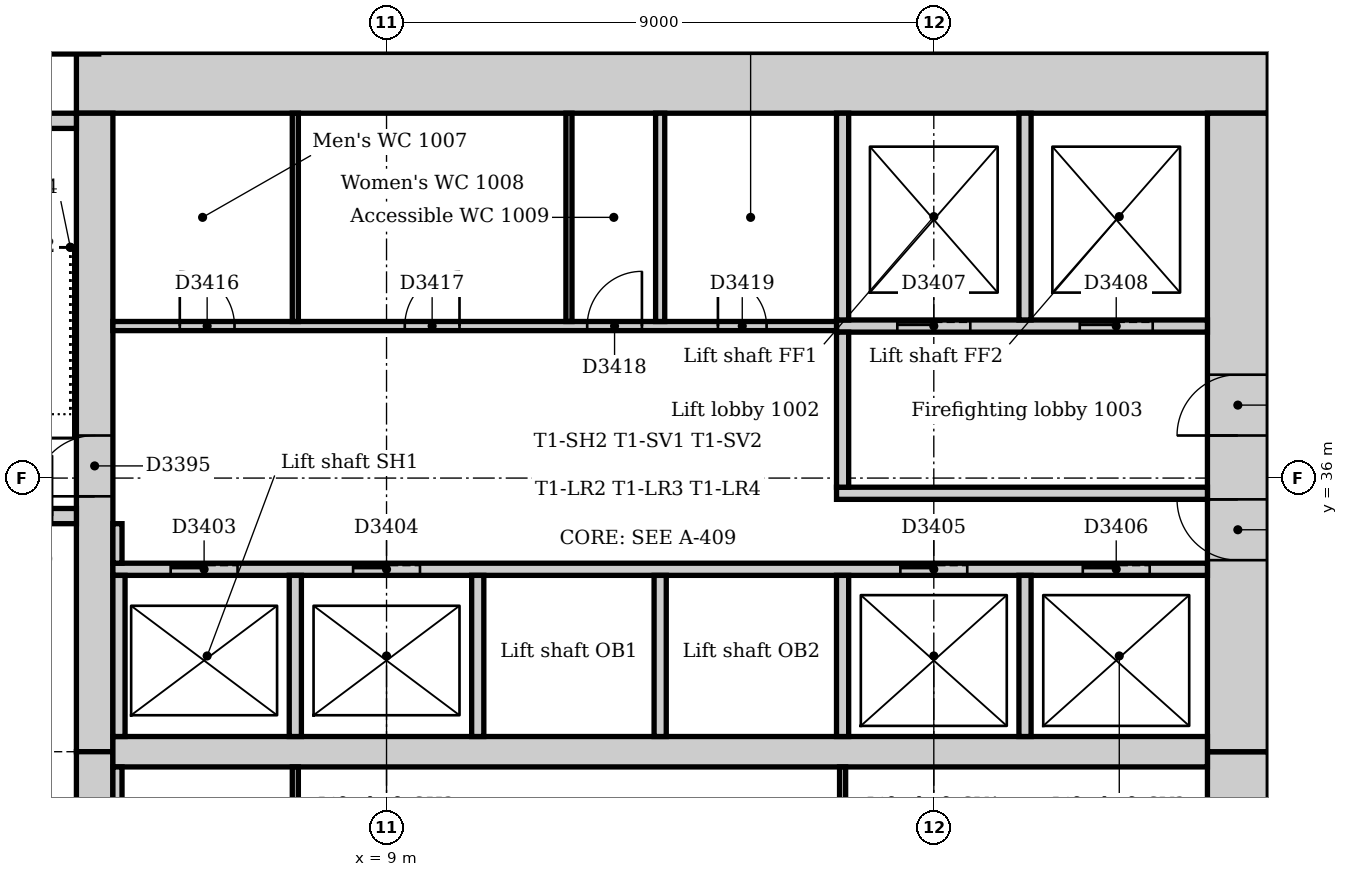
"""IFC4 building model, lengths in metres.
Left out: names, types, materials, properties, quantities, classifications, styles, units other than length and angle.
Written with IfcOpenShell. Run it as: python <this file> out.ifc"""

import sys

from ifc_helpers import new_model, si_unit, direction, frame, frame_2d, origin, origin_2d, place, context, subcontext, project, spatial, rectangle, extrude, element, fill, save


model = new_model("IFC4")
c1 = context("Model", 3, precision=1e-05, world=origin(), true_north=direction((0.0, 1.0)))
c2 = subcontext(c1, "Body", "Model", "MODEL_VIEW")
j1 = project(units=[si_unit("LENGTHUNIT", "METRE"), si_unit("PLANEANGLEUNIT", "RADIAN")], contexts=[c1])
p1 = place(None, origin())
s1 = spatial("IfcSite", under=j1, at=p1, CompositionType="ELEMENT")
p2 = place(p1, origin())
s2 = spatial("IfcBuilding", under=s1, at=p2, CompositionType="ELEMENT")
p3 = place(p2, frame((0.0, 0.0, 46.0)))
s3 = spatial("IfcBuildingStorey", under=s2, at=p3, CompositionType="ELEMENT", Elevation=46.0)
p4 = place(p3, frame((23.5, 42.5, 0.0), z_axis=(0.0, 0.0, 1.0), x_axis=(-1.0, 0.0, 0.0)))
e1 = element("IfcWall", 1, at=p4, inside=s3, PredefinedType="SOLIDWALL", context=c2, shape_type="SweptSolid", body=[
    extrude(rectangle(XDim=19.6, YDim=1.0, at=frame_2d((9.8, 0.0))), origin(), (0.0, 0.0, 1.0), 5.0),
])
p5 = place(p3, frame((23.0, 21.0, 0.0), z_axis=(0.0, 0.0, 1.0), x_axis=(0.0, 1.0, 0.0)))
e2 = element("IfcWall", 2, at=p5, inside=s3, PredefinedType="SOLIDWALL", context=c2, shape_type="SweptSolid", body=[
    extrude(rectangle(XDim=10.5, YDim=1.0, at=frame_2d((5.25, 0.0))), origin(), (0.0, 0.0, 1.0), 5.0),
])
p6 = place(p5, frame((3.7, 0.0, 0.0)))
e3 = element("IfcOpeningElement", 3, at=p6, cuts=e2, PredefinedType="OPENING", context=c2, shape_type="SweptSolid", body=[
    extrude(rectangle(XDim=1.8, YDim=2.1, at=frame_2d((0.9, 1.05))), frame((0.0, 0.51, 0.0), z_axis=(0.0, -1.0, 0.0), x_axis=(1.0, 0.0, 0.0)), (0.0, 0.0, 1.0), 1.02),
])
p7 = place(p3, frame((23.0, 31.5, 0.0), z_axis=(0.0, 0.0, 1.0), x_axis=(0.0, 1.0, 0.0)))
e4 = element("IfcWall", 4, at=p7, inside=s3, PredefinedType="SOLIDWALL", context=c2, shape_type="SweptSolid", body=[
    extrude(rectangle(XDim=10.5, YDim=1.0, at=frame_2d((5.25, 0.0))), origin(), (0.0, 0.0, 1.0), 5.0),
])
p8 = place(p7, frame((3.15, 0.0, 0.0)))
e5 = element("IfcOpeningElement", 5, at=p8, cuts=e4, PredefinedType="OPENING", context=c2, shape_type="SweptSolid", body=[
    extrude(rectangle(XDim=1.0, YDim=2.1, at=frame_2d((0.5, 1.05))), frame((0.0, 0.51, 0.0), z_axis=(0.0, -1.0, 0.0), x_axis=(1.0, 0.0, 0.0)), (0.0, 0.0, 1.0), 1.02),
])
p9 = place(p7, frame((5.2, 0.0, 0.0)))
e6 = element("IfcOpeningElement", 6, at=p9, cuts=e4, PredefinedType="OPENING", context=c2, shape_type="SweptSolid", body=[
    extrude(rectangle(XDim=1.0, YDim=2.1, at=frame_2d((0.5, 1.05))), frame((0.0, 0.51, 0.0), z_axis=(0.0, -1.0, 0.0), x_axis=(1.0, 0.0, 0.0)), (0.0, 0.0, 1.0), 1.02),
])
p10 = place(p3, frame((4.2, 42.0, 0.0), z_axis=(0.0, 0.0, 1.0), x_axis=(0.0, -1.0, 0.0)))
e7 = element("IfcWall", 7, at=p10, inside=s3, PredefinedType="SOLIDWALL", context=c2, shape_type="SweptSolid", body=[
    extrude(rectangle(XDim=10.5, YDim=0.6, at=frame_2d((5.25, 0.0))), origin(), (0.0, 0.0, 1.0), 5.0),
])
p11 = place(p10, frame((5.3, 0.0, 0.0)))
e8 = element("IfcOpeningElement", 8, at=p11, cuts=e7, PredefinedType="OPENING", context=c2, shape_type="SweptSolid", body=[
    extrude(rectangle(XDim=1.0, YDim=2.1, at=frame_2d((0.5, 1.05))), frame((0.0, 0.31, 0.0), z_axis=(0.0, -1.0, 0.0), x_axis=(1.0, 0.0, 0.0)), (0.0, 0.0, 1.0), 0.62),
])
p12 = place(p3, frame((4.2, 31.5, 0.0), z_axis=(0.0, 0.0, 1.0), x_axis=(0.0, -1.0, 0.0)))
e9 = element("IfcWall", 9, at=p12, inside=s3, PredefinedType="SOLIDWALL", context=c2, shape_type="SweptSolid", body=[
    extrude(rectangle(XDim=10.5, YDim=0.6, at=frame_2d((5.25, 0.0))), origin(), (0.0, 0.0, 1.0), 5.0),
])
p13 = place(p12, frame((4.25, 0.0, 0.0)))
e10 = element("IfcOpeningElement", 10, at=p13, cuts=e9, PredefinedType="OPENING", context=c2, shape_type="SweptSolid", body=[
    extrude(rectangle(XDim=1.0, YDim=2.1, at=frame_2d((0.5, 1.05))), frame((0.0, 0.31, 0.0), z_axis=(0.0, -1.0, 0.0), x_axis=(1.0, 0.0, 0.0)), (0.0, 0.0, 1.0), 0.62),
])
p14 = place(p3, frame((4.5, 31.5, 0.0), z_axis=(0.0, 0.0, 1.0), x_axis=(1.0, 0.0, 0.0)))
e11 = element("IfcWall", 11, at=p14, inside=s3, PredefinedType="SOLIDWALL", context=c2, shape_type="SweptSolid", body=[
    extrude(rectangle(XDim=18.0, YDim=0.5, at=frame_2d((9.0, 0.0))), origin(), (0.0, 0.0, 1.0), 5.0),
])
p15 = place(p3, frame((0.36, 35.375, 0.0), z_axis=(0.0, 0.0, 1.0), x_axis=(1.0, 0.0, 0.0)))
e12 = element("IfcWall", 12, at=p15, inside=s3, PredefinedType="SOLIDWALL", context=c2, shape_type="SweptSolid", body=[
    extrude(rectangle(XDim=3.54, YDim=0.25, at=frame_2d((1.77, 0.0))), origin(), (0.0, 0.0, 1.0), 5.0),
])
p16 = place(p15, frame((2.14, 0.0, 0.0)))
e13 = element("IfcOpeningElement", 13, at=p16, cuts=e12, PredefinedType="OPENING", context=c2, shape_type="SweptSolid", body=[
    extrude(rectangle(XDim=1.0, YDim=2.1, at=frame_2d((0.5, 1.05))), frame((0.0, 0.135, 0.0), z_axis=(0.0, -1.0, 0.0), x_axis=(1.0, 0.0, 0.0)), (0.0, 0.0, 1.0), 0.27),
])
p17 = place(p3, frame((3.9, 41.875, 0.0), z_axis=(0.0, 0.0, 1.0), x_axis=(-1.0, 0.0, 0.0)))
e14 = element("IfcWall", 14, at=p17, inside=s3, PredefinedType="SOLIDWALL", context=c2, shape_type="SweptSolid", body=[
    extrude(rectangle(XDim=3.54, YDim=0.25, at=frame_2d((1.77, 0.0))), origin(), (0.0, 0.0, 1.0), 5.0),
])
p18 = place(p3, frame((3.667, 43.574, 0.0), z_axis=(0.0, 0.0, 1.0), x_axis=(1.0, 0.0, 0.0)))
e15 = element("IfcColumn", 15, at=p18, inside=s3, PredefinedType="COLUMN", context=c2, shape_type="SweptSolid", body=[
    extrude(rectangle(XDim=1.2, YDim=1.2, at=origin_2d()), origin(), (0.0, 0.0, 1.0), 4.85),
])
p19 = place(p3, frame((16.4, 35.75, 0.0), z_axis=(0.0, 0.0, 1.0), x_axis=(1.0, 0.0, 0.0)))
e16 = element("IfcWall", 16, at=p19, inside=s3, PredefinedType="PARTITIONING", context=c2, shape_type="SweptSolid", body=[
    extrude(rectangle(XDim=6.1, YDim=0.2, at=frame_2d((3.05, 0.0))), origin(), (0.0, 0.0, 1.0), 4.85),
])
p20 = place(p3, frame((16.4, 38.5, 0.0), z_axis=(0.0, 0.0, 1.0), x_axis=(1.0, 0.0, 0.0)))
e17 = element("IfcWall", 17, at=p20, inside=s3, PredefinedType="PARTITIONING", context=c2, shape_type="SweptSolid", body=[
    extrude(rectangle(XDim=6.1, YDim=0.2, at=frame_2d((3.05, 0.0))), origin(), (0.0, 0.0, 1.0), 4.85),
])
p21 = place(p20, frame((1.0, 0.0, 0.0)))
e18 = element("IfcOpeningElement", 18, at=p21, cuts=e17, PredefinedType="OPENING", context=c2, shape_type="SweptSolid", body=[
    extrude(rectangle(XDim=1.2, YDim=2.1, at=frame_2d((0.6, 1.05))), frame((0.0, 0.11, 0.0), z_axis=(0.0, -1.0, 0.0), x_axis=(1.0, 0.0, 0.0)), (0.0, 0.0, 1.0), 0.22),
])
p22 = place(p20, frame((4.0, 0.0, 0.0)))
e19 = element("IfcOpeningElement", 19, at=p22, cuts=e17, PredefinedType="OPENING", context=c2, shape_type="SweptSolid", body=[
    extrude(rectangle(XDim=1.2, YDim=2.1, at=frame_2d((0.6, 1.05))), frame((0.0, 0.11, 0.0), z_axis=(0.0, -1.0, 0.0), x_axis=(1.0, 0.0, 0.0)), (0.0, 0.0, 1.0), 0.22),
])
p23 = place(p3, frame((16.5, 35.85, 0.0), z_axis=(0.0, 0.0, 1.0), x_axis=(0.0, 1.0, 0.0)))
e20 = element("IfcWall", 20, at=p23, inside=s3, PredefinedType="PARTITIONING", context=c2, shape_type="SweptSolid", body=[
    extrude(rectangle(XDim=2.55, YDim=0.2, at=frame_2d((1.275, 0.0))), origin(), (0.0, 0.0, 1.0), 4.85),
])
p24 = place(p3, frame((4.5, 34.5, 0.0), z_axis=(0.0, 0.0, 1.0), x_axis=(1.0, 0.0, 0.0)))
e21 = element("IfcWall", 21, at=p24, inside=s3, PredefinedType="PARTITIONING", context=c2, shape_type="SweptSolid", body=[
    extrude(rectangle(XDim=18.0, YDim=0.2, at=frame_2d((9.0, 0.0))), origin(), (0.0, 0.0, 1.0), 4.85),
])
p25 = place(p24, frame((0.95, 0.0, 0.0)))
e22 = element("IfcOpeningElement", 22, at=p25, cuts=e21, PredefinedType="OPENING", context=c2, shape_type="SweptSolid", body=[
    extrude(rectangle(XDim=1.1, YDim=2.1, at=frame_2d((0.55, 1.05))), frame((0.0, 0.11, 0.0), z_axis=(0.0, -1.0, 0.0), x_axis=(1.0, 0.0, 0.0)), (0.0, 0.0, 1.0), 0.22),
])
p26 = place(p24, frame((3.95, 0.0, 0.0)))
e23 = element("IfcOpeningElement", 23, at=p26, cuts=e21, PredefinedType="OPENING", context=c2, shape_type="SweptSolid", body=[
    extrude(rectangle(XDim=1.1, YDim=2.1, at=frame_2d((0.55, 1.05))), frame((0.0, 0.11, 0.0), z_axis=(0.0, -1.0, 0.0), x_axis=(1.0, 0.0, 0.0)), (0.0, 0.0, 1.0), 0.22),
])
p27 = place(p24, frame((12.95, 0.0, 0.0)))
e24 = element("IfcOpeningElement", 24, at=p27, cuts=e21, PredefinedType="OPENING", context=c2, shape_type="SweptSolid", body=[
    extrude(rectangle(XDim=1.1, YDim=2.1, at=frame_2d((0.55, 1.05))), frame((0.0, 0.11, 0.0), z_axis=(0.0, -1.0, 0.0), x_axis=(1.0, 0.0, 0.0)), (0.0, 0.0, 1.0), 0.22),
])
p28 = place(p24, frame((15.95, 0.0, 0.0)))
e25 = element("IfcOpeningElement", 25, at=p28, cuts=e21, PredefinedType="OPENING", context=c2, shape_type="SweptSolid", body=[
    extrude(rectangle(XDim=1.1, YDim=2.1, at=frame_2d((0.55, 1.05))), frame((0.0, 0.11, 0.0), z_axis=(0.0, -1.0, 0.0), x_axis=(1.0, 0.0, 0.0)), (0.0, 0.0, 1.0), 0.22),
])
for number, where, z_axis, x_axis in (
    (26, (16.5, 38.6, 0.0), (0.0, 0.0, 1.0), (0.0, 1.0, 0.0)),
    (27, (19.5, 38.6, 0.0), (0.0, 0.0, 1.0), (0.0, 1.0, 0.0)),
):
    element("IfcWall", number, at=place(p3, frame(where, z_axis=z_axis, x_axis=x_axis)), inside=s3, PredefinedType="PARTITIONING", context=c2, shape_type="SweptSolid", body=[
        extrude(rectangle(XDim=3.4, YDim=0.2, at=frame_2d((1.7, 0.0))), origin(), (0.0, 0.0, 1.0), 4.85),
    ])
for number, where, z_axis, x_axis in (
    (28, (4.6, 31.75, 0.0), (0.0, 0.0, 1.0), (0.0, 1.0, 0.0)),
    (29, (7.5, 31.75, 0.0), (0.0, 0.0, 1.0), (0.0, 1.0, 0.0)),
    (30, (10.5, 31.75, 0.0), (0.0, 0.0, 1.0), (0.0, 1.0, 0.0)),
    (31, (13.5, 31.75, 0.0), (0.0, 0.0, 1.0), (0.0, 1.0, 0.0)),
    (32, (16.5, 31.75, 0.0), (0.0, 0.0, 1.0), (0.0, 1.0, 0.0)),
    (33, (19.5, 31.75, 0.0), (0.0, 0.0, 1.0), (0.0, 1.0, 0.0)),
):
    element("IfcWall", number, at=place(p3, frame(where, z_axis=z_axis, x_axis=x_axis)), inside=s3, PredefinedType="PARTITIONING", context=c2, shape_type="SweptSolid", body=[
        extrude(rectangle(XDim=2.65, YDim=0.2, at=frame_2d((1.325, 0.0))), origin(), (0.0, 0.0, 1.0), 4.85),
    ])
p29 = place(p3, frame((4.5, 38.5, 0.0), z_axis=(0.0, 0.0, 1.0), x_axis=(1.0, 0.0, 0.0)))
e34 = element("IfcWall", 34, at=p29, inside=s3, PredefinedType="PARTITIONING", context=c2, shape_type="SweptSolid", body=[
    extrude(rectangle(XDim=11.9, YDim=0.15, at=frame_2d((5.95, 0.0))), origin(), (0.0, 0.0, 1.0), 4.85),
])
p30 = place(p29, frame((1.1, 0.0, 0.0)))
e35 = element("IfcOpeningElement", 35, at=p30, cuts=e34, PredefinedType="OPENING", context=c2, shape_type="SweptSolid", body=[
    extrude(rectangle(XDim=0.9, YDim=2.1, at=frame_2d((0.45, 1.05))), frame((0.0, 0.085, 0.0), z_axis=(0.0, -1.0, 0.0), x_axis=(1.0, 0.0, 0.0)), (0.0, 0.0, 1.0), 0.17),
])
p31 = place(p29, frame((4.8, 0.0, 0.0)))
e36 = element("IfcOpeningElement", 36, at=p31, cuts=e34, PredefinedType="OPENING", context=c2, shape_type="SweptSolid", body=[
    extrude(rectangle(XDim=0.9, YDim=2.1, at=frame_2d((0.45, 1.05))), frame((0.0, 0.085, 0.0), z_axis=(0.0, -1.0, 0.0), x_axis=(1.0, 0.0, 0.0)), (0.0, 0.0, 1.0), 0.17),
])
p32 = place(p29, frame((7.8, 0.0, 0.0)))
e37 = element("IfcOpeningElement", 37, at=p32, cuts=e34, PredefinedType="OPENING", context=c2, shape_type="SweptSolid", body=[
    extrude(rectangle(XDim=0.9, YDim=2.1, at=frame_2d((0.45, 1.05))), frame((0.0, 0.085, 0.0), z_axis=(0.0, -1.0, 0.0), x_axis=(1.0, 0.0, 0.0)), (0.0, 0.0, 1.0), 0.17),
])
p33 = place(p29, frame((9.95, 0.0, 0.0)))
e38 = element("IfcOpeningElement", 38, at=p33, cuts=e34, PredefinedType="OPENING", context=c2, shape_type="SweptSolid", body=[
    extrude(rectangle(XDim=0.8, YDim=2.1, at=frame_2d((0.4, 1.05))), frame((0.0, 0.085, 0.0), z_axis=(0.0, -1.0, 0.0), x_axis=(1.0, 0.0, 0.0)), (0.0, 0.0, 1.0), 0.17),
])
p34 = place(p3, frame((4.575, 28.575, 0.0), z_axis=(0.0, 0.0, 1.0), x_axis=(0.0, 1.0, 0.0)))
e39 = element("IfcWall", 39, at=p34, inside=s3, PredefinedType="PARTITIONING", context=c2, shape_type="SweptSolid", body=[
    extrude(rectangle(XDim=2.675, YDim=0.15, at=frame_2d((1.337, 0.0))), origin(), (0.0, 0.0, 1.0), 4.85),
])
p35 = place(p3, frame((4.575, 34.6, 0.0), z_axis=(0.0, 0.0, 1.0), x_axis=(0.0, 1.0, 0.0)))
e40 = element("IfcWall", 40, at=p35, inside=s3, PredefinedType="PARTITIONING", context=c2, shape_type="SweptSolid", body=[
    extrude(rectangle(XDim=0.65, YDim=0.15, at=frame_2d((0.325, 0.0))), origin(), (0.0, 0.0, 1.0), 4.85),
])
p36 = place(p3, frame((13.5, 38.575, 0.0), z_axis=(0.0, 0.0, 1.0), x_axis=(0.0, 1.0, 0.0)))
e41 = element("IfcWall", 41, at=p36, inside=s3, PredefinedType="PARTITIONING", context=c2, shape_type="SweptSolid", body=[
    extrude(rectangle(XDim=3.425, YDim=0.15, at=frame_2d((1.712, 0.0))), origin(), (0.0, 0.0, 1.0), 4.85),
])
for number, where, z_axis, x_axis in (
    (42, (7.5, 38.575, 0.0), (0.0, 0.0, 1.0), (0.0, 1.0, 0.0)),
    (43, (12.0, 38.575, 0.0), (0.0, 0.0, 1.0), (0.0, 1.0, 0.0)),
):
    element("IfcWall", number, at=place(p3, frame(where, z_axis=z_axis, x_axis=x_axis)), inside=s3, PredefinedType="PARTITIONING", context=c2, shape_type="SweptSolid", body=[
        extrude(rectangle(XDim=3.425, YDim=0.1, at=frame_2d((1.712, 0.0))), origin(), (0.0, 0.0, 1.0), 4.85),
    ])
for number, where, z_axis, x_axis in (
    (44, (7.5, 28.575, 0.0), (0.0, 0.0, 1.0), (0.0, 1.0, 0.0)),
    (45, (16.5, 28.575, 0.0), (0.0, 0.0, 1.0), (0.0, 1.0, 0.0)),
):
    element("IfcWall", number, at=place(p3, frame(where, z_axis=z_axis, x_axis=x_axis)), inside=s3, PredefinedType="PARTITIONING", context=c2, shape_type="SweptSolid", body=[
        extrude(rectangle(XDim=2.675, YDim=0.1, at=frame_2d((1.337, 0.0))), origin(), (0.0, 0.0, 1.0), 4.85),
    ])
p37 = place(p11, frame((1.0, 0.0, 0.0), z_axis=(0.0, 0.0, 1.0), x_axis=(-1.0, 0.0, 0.0)))
e46 = element("IfcDoor", 46, at=p37, inside=s3, OperationType="SINGLE_SWING_LEFT", PredefinedType="DOOR", context=c2, shape_type="SweptSolid", body=[
    extrude(rectangle(XDim=1.0, YDim=2.1, at=frame_2d((0.5, 1.05))), frame((0.0, 0.025, 0.0), z_axis=(0.0, -1.0, 0.0), x_axis=(1.0, 0.0, 0.0)), (0.0, 0.0, 1.0), 0.05),
])
fill(e8, e46)
p38 = place(p25, origin())
e47 = element("IfcDoor", 47, at=p38, inside=s3, OperationType="SLIDING_TO_LEFT", PredefinedType="DOOR", context=c2, shape_type="SweptSolid", body=[
    extrude(rectangle(XDim=1.1, YDim=2.1, at=frame_2d((0.55, 1.05))), frame((0.0, 0.025, 0.0), z_axis=(0.0, -1.0, 0.0), x_axis=(1.0, 0.0, 0.0)), (0.0, 0.0, 1.0), 0.05),
])
fill(e22, e47)
p39 = place(p26, origin())
e48 = element("IfcDoor", 48, at=p39, inside=s3, OperationType="SLIDING_TO_LEFT", PredefinedType="DOOR", context=c2, shape_type="SweptSolid", body=[
    extrude(rectangle(XDim=1.1, YDim=2.1, at=frame_2d((0.55, 1.05))), frame((0.0, 0.025, 0.0), z_axis=(0.0, -1.0, 0.0), x_axis=(1.0, 0.0, 0.0)), (0.0, 0.0, 1.0), 0.05),
])
fill(e23, e48)
p40 = place(p27, origin())
e49 = element("IfcDoor", 49, at=p40, inside=s3, OperationType="SLIDING_TO_LEFT", PredefinedType="DOOR", context=c2, shape_type="SweptSolid", body=[
    extrude(rectangle(XDim=1.1, YDim=2.1, at=frame_2d((0.55, 1.05))), frame((0.0, 0.025, 0.0), z_axis=(0.0, -1.0, 0.0), x_axis=(1.0, 0.0, 0.0)), (0.0, 0.0, 1.0), 0.05),
])
fill(e24, e49)
p41 = place(p28, origin())
e50 = element("IfcDoor", 50, at=p41, inside=s3, OperationType="SLIDING_TO_LEFT", PredefinedType="DOOR", context=c2, shape_type="SweptSolid", body=[
    extrude(rectangle(XDim=1.1, YDim=2.1, at=frame_2d((0.55, 1.05))), frame((0.0, 0.025, 0.0), z_axis=(0.0, -1.0, 0.0), x_axis=(1.0, 0.0, 0.0)), (0.0, 0.0, 1.0), 0.05),
])
fill(e25, e50)
p42 = place(p21, origin())
e51 = element("IfcDoor", 51, at=p42, inside=s3, OperationType="SLIDING_TO_LEFT", PredefinedType="DOOR", context=c2, shape_type="SweptSolid", body=[
    extrude(rectangle(XDim=1.2, YDim=2.1, at=frame_2d((0.6, 1.05))), frame((0.0, 0.025, 0.0), z_axis=(0.0, -1.0, 0.0), x_axis=(1.0, 0.0, 0.0)), (0.0, 0.0, 1.0), 0.05),
])
fill(e18, e51)
p43 = place(p22, origin())
e52 = element("IfcDoor", 52, at=p43, inside=s3, OperationType="SLIDING_TO_LEFT", PredefinedType="DOOR", context=c2, shape_type="SweptSolid", body=[
    extrude(rectangle(XDim=1.2, YDim=2.1, at=frame_2d((0.6, 1.05))), frame((0.0, 0.025, 0.0), z_axis=(0.0, -1.0, 0.0), x_axis=(1.0, 0.0, 0.0)), (0.0, 0.0, 1.0), 0.05),
])
fill(e19, e52)
p44 = place(p8, origin())
e53 = element("IfcDoor", 53, at=p44, inside=s3, OperationType="SINGLE_SWING_RIGHT", PredefinedType="DOOR", context=c2, shape_type="SweptSolid", body=[
    extrude(rectangle(XDim=1.0, YDim=2.1, at=frame_2d((0.5, 1.05))), frame((0.0, 0.025, 0.0), z_axis=(0.0, -1.0, 0.0), x_axis=(1.0, 0.0, 0.0)), (0.0, 0.0, 1.0), 0.05),
])
fill(e5, e53)
p45 = place(p9, origin())
e54 = element("IfcDoor", 54, at=p45, inside=s3, OperationType="SINGLE_SWING_LEFT", PredefinedType="DOOR", context=c2, shape_type="SweptSolid", body=[
    extrude(rectangle(XDim=1.0, YDim=2.1, at=frame_2d((0.5, 1.05))), frame((0.0, 0.025, 0.0), z_axis=(0.0, -1.0, 0.0), x_axis=(1.0, 0.0, 0.0)), (0.0, 0.0, 1.0), 0.05),
])
fill(e6, e54)
p46 = place(p30, origin())
e55 = element("IfcDoor", 55, at=p46, inside=s3, OperationType="SINGLE_SWING_LEFT", PredefinedType="DOOR", context=c2, shape_type="SweptSolid", body=[
    extrude(rectangle(XDim=0.9, YDim=2.1, at=frame_2d((0.45, 1.05))), frame((0.0, 0.025, 0.0), z_axis=(0.0, -1.0, 0.0), x_axis=(1.0, 0.0, 0.0)), (0.0, 0.0, 1.0), 0.05),
])
fill(e35, e55)
p47 = place(p31, origin())
e56 = element("IfcDoor", 56, at=p47, inside=s3, OperationType="SINGLE_SWING_RIGHT", PredefinedType="DOOR", context=c2, shape_type="SweptSolid", body=[
    extrude(rectangle(XDim=0.9, YDim=2.1, at=frame_2d((0.45, 1.05))), frame((0.0, 0.025, 0.0), z_axis=(0.0, -1.0, 0.0), x_axis=(1.0, 0.0, 0.0)), (0.0, 0.0, 1.0), 0.05),
])
fill(e36, e56)
p48 = place(p32, origin())
e57 = element("IfcDoor", 57, at=p48, inside=s3, OperationType="SINGLE_SWING_RIGHT", PredefinedType="DOOR", context=c2, shape_type="SweptSolid", body=[
    extrude(rectangle(XDim=0.9, YDim=2.1, at=frame_2d((0.45, 1.05))), frame((0.0, 0.025, 0.0), z_axis=(0.0, -1.0, 0.0), x_axis=(1.0, 0.0, 0.0)), (0.0, 0.0, 1.0), 0.05),
])
fill(e37, e57)
p49 = place(p33, origin())
e58 = element("IfcDoor", 58, at=p49, inside=s3, OperationType="SINGLE_SWING_LEFT", PredefinedType="DOOR", context=c2, shape_type="SweptSolid", body=[
    extrude(rectangle(XDim=0.8, YDim=2.1, at=frame_2d((0.4, 1.05))), frame((0.0, 0.025, 0.0), z_axis=(0.0, -1.0, 0.0), x_axis=(1.0, 0.0, 0.0)), (0.0, 0.0, 1.0), 0.05),
])
fill(e38, e58)
save(model, sys.argv[1])
